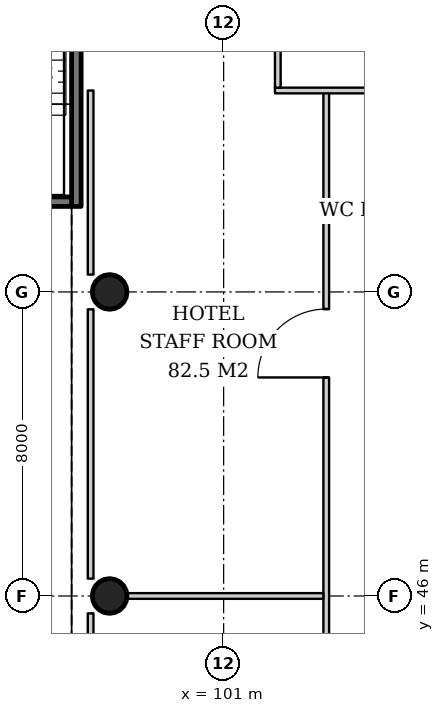
"""IFC4 building model, lengths in metres.
Left out: names, types, materials, properties, quantities, classifications, styles, units other than length and angle.
Written with IfcOpenShell. Run it as: python <this file> out.ifc"""

import sys

from ifc_helpers import new_model, si_unit, direction, frame, frame_2d, origin, origin_2d, place, context, subcontext, project, spatial, rectangle, hollow_circle, extrude, element, fill, save


model = new_model("IFC4")
c1 = context("Model", 3, precision=1e-05, world=origin(), true_north=direction((0.0, 1.0)))
c2 = subcontext(c1, "Body", "Model", "MODEL_VIEW")
j1 = project(units=[si_unit("LENGTHUNIT", "METRE"), si_unit("PLANEANGLEUNIT", "RADIAN")], contexts=[c1])
p1 = place(None, origin())
s1 = spatial("IfcSite", under=j1, at=p1, CompositionType="ELEMENT")
p2 = place(p1, origin())
s2 = spatial("IfcBuilding", under=s1, at=p2, CompositionType="ELEMENT")
p3 = place(p2, frame((0.0, 0.0, -5.0)))
s3 = spatial("IfcBuildingStorey", under=s2, at=p3, CompositionType="ELEMENT", Elevation=-5.0)
for number, where, z_axis, x_axis in (
    (1, (98.0, 54.0, 0.0), (0.0, 0.0, 1.0), (1.0, 0.0, 0.0)),
    (2, (98.0, 46.0, 0.0), (0.0, 0.0, 1.0), (1.0, 0.0, 0.0)),
):
    element("IfcColumn", number, at=place(p3, frame(where, z_axis=z_axis, x_axis=x_axis)), inside=s3, PredefinedType="COLUMN", context=c2, shape_type="SweptSolid", body=[
        extrude(hollow_circle(Radius=0.457, WallThickness=0.03, at=origin_2d()), origin(), (0.0, 0.0, 1.0), 5.0),
    ])
p4 = place(p3, frame((97.125, 56.25, 0.0), z_axis=(0.0, 0.0, 1.0), x_axis=(0.0, 1.0, 0.0)))
e3 = element("IfcWall", 3, at=p4, inside=s3, PredefinedType="SOLIDWALL", context=c2, shape_type="SweptSolid", body=[
    extrude(rectangle(XDim=8.5, YDim=0.25, at=frame_2d((4.25, 0.0))), origin(), (0.0, 0.0, 1.0), 4.6),
])
p5 = place(p3, frame((94.0, 56.375, 0.0), z_axis=(0.0, 0.0, 1.0), x_axis=(1.0, 0.0, 0.0)))
e4 = element("IfcWall", 4, at=p5, inside=s3, PredefinedType="SOLIDWALL", context=c2, shape_type="SweptSolid", body=[
    extrude(rectangle(XDim=3.0, YDim=0.25, at=frame_2d((1.5, 0.0))), origin(), (0.0, 0.0, 1.0), 4.6),
])
for number, where, z_axis, x_axis in (
    (5, (97.5, 38.457, 0.0), (0.0, 0.0, 1.0), (0.0, 1.0, 0.0)),
    (6, (97.5, 46.457, 0.0), (0.0, 0.0, 1.0), (0.0, 1.0, 0.0)),
):
    element("IfcWall", number, at=place(p3, frame(where, z_axis=z_axis, x_axis=x_axis)), inside=s3, PredefinedType="PARTITIONING", context=c2, shape_type="SweptSolid", body=[
        extrude(rectangle(XDim=7.086, YDim=0.15, at=frame_2d((3.543, 0.0))), origin(), (0.0, 0.0, 1.0), 4.7),
    ])
p6 = place(p3, frame((97.5, 54.457, 0.0), z_axis=(0.0, 0.0, 1.0), x_axis=(0.0, 1.0, 0.0)))
e7 = element("IfcWall", 7, at=p6, inside=s3, PredefinedType="PARTITIONING", context=c2, shape_type="SweptSolid", body=[
    extrude(rectangle(XDim=4.843, YDim=0.15, at=frame_2d((2.421, 0.0))), origin(), (0.0, 0.0, 1.0), 4.7),
])
p7 = place(p3, frame((103.7, 32.7, 0.0), z_axis=(0.0, 0.0, 1.0), x_axis=(0.0, 1.0, 0.0)))
e8 = element("IfcWall", 8, at=p7, inside=s3, PredefinedType="PARTITIONING", context=c2, shape_type="SweptSolid", body=[
    extrude(rectangle(XDim=26.6, YDim=0.15, at=frame_2d((13.3, 0.0))), origin(), (0.0, 0.0, 1.0), 3.9),
])
p8 = place(p7, frame((5.75, 0.0, 0.0)))
e9 = element("IfcOpeningElement", 9, at=p8, cuts=e8, PredefinedType="OPENING", context=c2, shape_type="SweptSolid", body=[
    extrude(rectangle(XDim=1.8, YDim=2.4, at=frame_2d((0.9, 1.2))), frame((0.0, 0.085, 0.0), z_axis=(0.0, -1.0, 0.0), x_axis=(1.0, 0.0, 0.0)), (0.0, 0.0, 1.0), 0.17),
])
p9 = place(p7, frame((19.05, 0.0, 0.0)))
e10 = element("IfcOpeningElement", 10, at=p9, cuts=e8, PredefinedType="OPENING", context=c2, shape_type="SweptSolid", body=[
    extrude(rectangle(XDim=1.8, YDim=2.4, at=frame_2d((0.9, 1.2))), frame((0.0, 0.085, 0.0), z_axis=(0.0, -1.0, 0.0), x_axis=(1.0, 0.0, 0.0)), (0.0, 0.0, 1.0), 0.17),
])
p10 = place(p3, frame((98.457, 46.0, 0.0), z_axis=(0.0, 0.0, 1.0), x_axis=(1.0, 0.0, 0.0)))
e11 = element("IfcWall", 11, at=p10, inside=s3, PredefinedType="PARTITIONING", context=c2, shape_type="SweptSolid", body=[
    extrude(rectangle(XDim=5.168, YDim=0.15, at=frame_2d((2.584, 0.0))), origin(), (0.0, 0.0, 1.0), 4.7),
])
p11 = place(p3, frame((102.35, 59.3, 0.0), z_axis=(0.0, 0.0, 1.0), x_axis=(1.0, 0.0, 0.0)))
e12 = element("IfcWall", 12, at=p11, inside=s3, PredefinedType="PARTITIONING", context=c2, shape_type="SweptSolid", body=[
    extrude(rectangle(XDim=10.725, YDim=0.15, at=frame_2d((5.362, 0.0))), origin(), (0.0, 0.0, 1.0), 3.947),
])
p12 = place(p3, frame((102.425, 59.375, 0.0), z_axis=(0.0, 0.0, 1.0), x_axis=(0.0, 1.0, 0.0)))
e13 = element("IfcWall", 13, at=p12, inside=s3, PredefinedType="PARTITIONING", context=c2, shape_type="SweptSolid", body=[
    extrude(rectangle(XDim=3.55, YDim=0.15, at=frame_2d((1.775, 0.0))), origin(), (0.0, 0.0, 1.0), 4.7),
])
p13 = place(p9, origin())
e14 = element("IfcDoor", 14, at=p13, inside=s3, OperationType="DOUBLE_DOOR_SINGLE_SWING", PredefinedType="DOOR", context=c2, shape_type="SweptSolid", body=[
    extrude(rectangle(XDim=1.8, YDim=2.4, at=frame_2d((0.9, 1.2))), frame((0.0, 0.025, 0.0), z_axis=(0.0, -1.0, 0.0), x_axis=(1.0, 0.0, 0.0)), (0.0, 0.0, 1.0), 0.05),
])
fill(e10, e14)
save(model, sys.argv[1])
